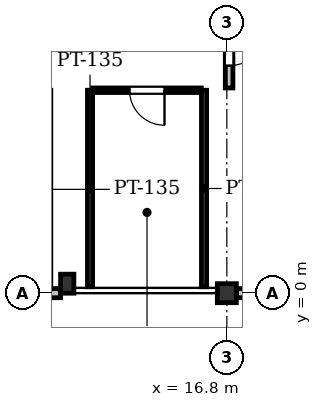
"""IFC4 building model, lengths in metres.
Left out: names, types, materials, properties, quantities, classifications, styles, units other than length and angle.
Written with IfcOpenShell. Run it as: python <this file> out.ifc"""

import sys

from ifc_helpers import new_model, si_unit, direction, frame, frame_2d, origin, origin_2d, place, context, subcontext, project, spatial, rectangle, i_section, extrude, element, fill, save


model = new_model("IFC4")
c1 = context("Model", 3, precision=1e-05, world=origin(), true_north=direction((0.0, 1.0)))
c2 = subcontext(c1, "Body", "Model", "MODEL_VIEW")
j1 = project(units=[si_unit("LENGTHUNIT", "METRE"), si_unit("PLANEANGLEUNIT", "RADIAN")], contexts=[c1])
p1 = place(None, origin())
s1 = spatial("IfcSite", under=j1, at=p1, CompositionType="ELEMENT")
p2 = place(p1, origin())
s2 = spatial("IfcBuilding", under=s1, at=p2, CompositionType="ELEMENT")
p3 = place(p2, frame((0.0, 0.0, 71.0)))
s3 = spatial("IfcBuildingStorey", under=s2, at=p3, CompositionType="ELEMENT", Elevation=71.0)
p4 = place(p3, frame((16.8, 0.0, 0.0), z_axis=(0.0, 0.0, 1.0), x_axis=(1.0, 0.0, 0.0)))
e1 = element("IfcColumn", 1, at=p4, inside=s3, PredefinedType="COLUMN", context=c2, shape_type="SweptSolid", body=[
    extrude(i_section(OverallWidth=0.5, OverallDepth=0.5, WebThickness=0.028, FlangeThickness=0.04, at=origin_2d()), origin(), (0.0, 0.0, 1.0), 4.2),
])
p5 = place(p3, frame((12.6, 0.25, 0.0), z_axis=(0.0, 0.0, 1.0), x_axis=(1.0, 0.0, 0.0)))
e2 = element("IfcColumn", 2, at=p5, inside=s3, PredefinedType="PILASTER", context=c2, shape_type="SweptSolid", body=[
    extrude(rectangle(XDim=0.35, YDim=0.5, at=origin_2d()), origin(), (0.0, 0.0, 1.0), 4.2),
])
p6 = place(p3, frame((20.825, 0.0, 0.0), z_axis=(0.0, 0.0, 1.0), x_axis=(-1.0, 0.0, 0.0)))
e3 = element("IfcWall", 3, at=p6, inside=s3, PredefinedType="STANDARD", context=c2, shape_type="SweptSolid", body=[
    extrude(rectangle(XDim=3.775, YDim=0.24, at=frame_2d((1.887, 0.0))), origin(), (0.0, 0.0, 1.0), 3.471),
])
p7 = place(p6, frame((1.137, 0.0, 0.9)))
e4 = element("IfcOpeningElement", 4, at=p7, cuts=e3, PredefinedType="OPENING", context=c2, shape_type="SweptSolid", body=[
    extrude(rectangle(XDim=1.5, YDim=1.6, at=frame_2d((0.75, 0.8))), frame((0.0, 0.13, 0.0), z_axis=(0.0, -1.0, 0.0), x_axis=(1.0, 0.0, 0.0)), (0.0, 0.0, 1.0), 0.26),
])
p8 = place(p3, frame((12.425, 0.0, 0.0), z_axis=(0.0, 0.0, 1.0), x_axis=(-1.0, 0.0, 0.0)))
e5 = element("IfcWall", 5, at=p8, inside=s3, PredefinedType="STANDARD", context=c2, shape_type="SweptSolid", body=[
    extrude(rectangle(XDim=3.775, YDim=0.24, at=frame_2d((1.888, 0.0))), origin(), (0.0, 0.0, 1.0), 3.471),
])
p9 = place(p8, frame((1.025, 0.0, 0.9)))
e6 = element("IfcOpeningElement", 6, at=p9, cuts=e5, PredefinedType="OPENING", context=c2, shape_type="SweptSolid", body=[
    extrude(rectangle(XDim=1.5, YDim=1.6, at=frame_2d((0.75, 0.8))), frame((0.0, 0.13, 0.0), z_axis=(0.0, -1.0, 0.0), x_axis=(1.0, 0.0, 0.0)), (0.0, 0.0, 1.0), 0.26),
])
for number, where, z_axis, x_axis in (
    (7, (13.2, 5.34, 0.0), (0.0, 0.0, 1.0), (0.0, -1.0, 0.0)),
    (8, (16.2, 0.169, 0.0), (0.0, 0.0, 1.0), (0.0, 1.0, 0.0)),
):
    element("IfcWall", number, at=place(p3, frame(where, z_axis=z_axis, x_axis=x_axis)), inside=s3, PredefinedType="PARTITIONING", context=c2, shape_type="SweptSolid", body=[
        extrude(rectangle(XDim=5.171, YDim=0.135, at=frame_2d((2.585, 0.0))), origin(), (0.0, 0.0, 1.0), 3.925),
    ])
p10 = place(p3, frame((16.128, 5.34, 0.0), z_axis=(0.0, 0.0, 1.0), x_axis=(-1.0, 0.0, 0.0)))
e9 = element("IfcWall", 9, at=p10, inside=s3, PredefinedType="PARTITIONING", context=c2, shape_type="SweptSolid", body=[
    extrude(rectangle(XDim=2.857, YDim=0.12, at=frame_2d((1.428, 0.0))), origin(), (0.0, 0.0, 1.0), 3.925),
])
p11 = place(p10, frame((0.969, 0.0, 0.0)))
e10 = element("IfcOpeningElement", 10, at=p11, cuts=e9, PredefinedType="OPENING", context=c2, shape_type="SweptSolid", body=[
    extrude(rectangle(XDim=0.92, YDim=2.1, at=frame_2d((0.46, 1.05))), frame((0.0, 0.07, 0.0), z_axis=(0.0, -1.0, 0.0), x_axis=(1.0, 0.0, 0.0)), (0.0, 0.0, 1.0), 0.14),
])
p12 = place(p3, frame((16.86, 7.576, 0.0), z_axis=(0.0, 0.0, 1.0), x_axis=(0.0, -1.0, 0.0)))
e11 = element("IfcWall", 11, at=p12, inside=s3, PredefinedType="PARTITIONING", context=c2, shape_type="SweptSolid", body=[
    extrude(rectangle(XDim=2.176, YDim=0.2, at=frame_2d((1.088, 0.0))), origin(), (0.0, 0.0, 1.0), 3.323),
])
p13 = place(p12, frame((0.588, 0.0, 0.0)))
e12 = element("IfcOpeningElement", 12, at=p13, cuts=e11, PredefinedType="OPENING", context=c2, shape_type="SweptSolid", body=[
    extrude(rectangle(XDim=1.0, YDim=2.15, at=frame_2d((0.5, 1.075))), frame((0.0, 0.11, 0.0), z_axis=(0.0, -1.0, 0.0), x_axis=(1.0, 0.0, 0.0)), (0.0, 0.0, 1.0), 0.22),
])
p14 = place(p11, origin())
e13 = element("IfcDoor", 13, at=p14, inside=s3, OperationType="SINGLE_SWING_LEFT", PredefinedType="DOOR", context=c2, shape_type="SweptSolid", body=[
    extrude(rectangle(XDim=0.92, YDim=2.1, at=frame_2d((0.46, 1.05))), frame((0.0, 0.025, 0.0), z_axis=(0.0, -1.0, 0.0), x_axis=(1.0, 0.0, 0.0)), (0.0, 0.0, 1.0), 0.05),
])
fill(e10, e13)
p15 = place(p13, origin())
e14 = element("IfcDoor", 14, at=p15, inside=s3, OperationType="SINGLE_SWING_LEFT", PredefinedType="DOOR", context=c2, shape_type="SweptSolid", body=[
    extrude(rectangle(XDim=1.0, YDim=2.15, at=frame_2d((0.5, 1.075))), frame((0.0, 0.025, 0.0), z_axis=(0.0, -1.0, 0.0), x_axis=(1.0, 0.0, 0.0)), (0.0, 0.0, 1.0), 0.05),
])
fill(e12, e14)
save(model, sys.argv[1])
